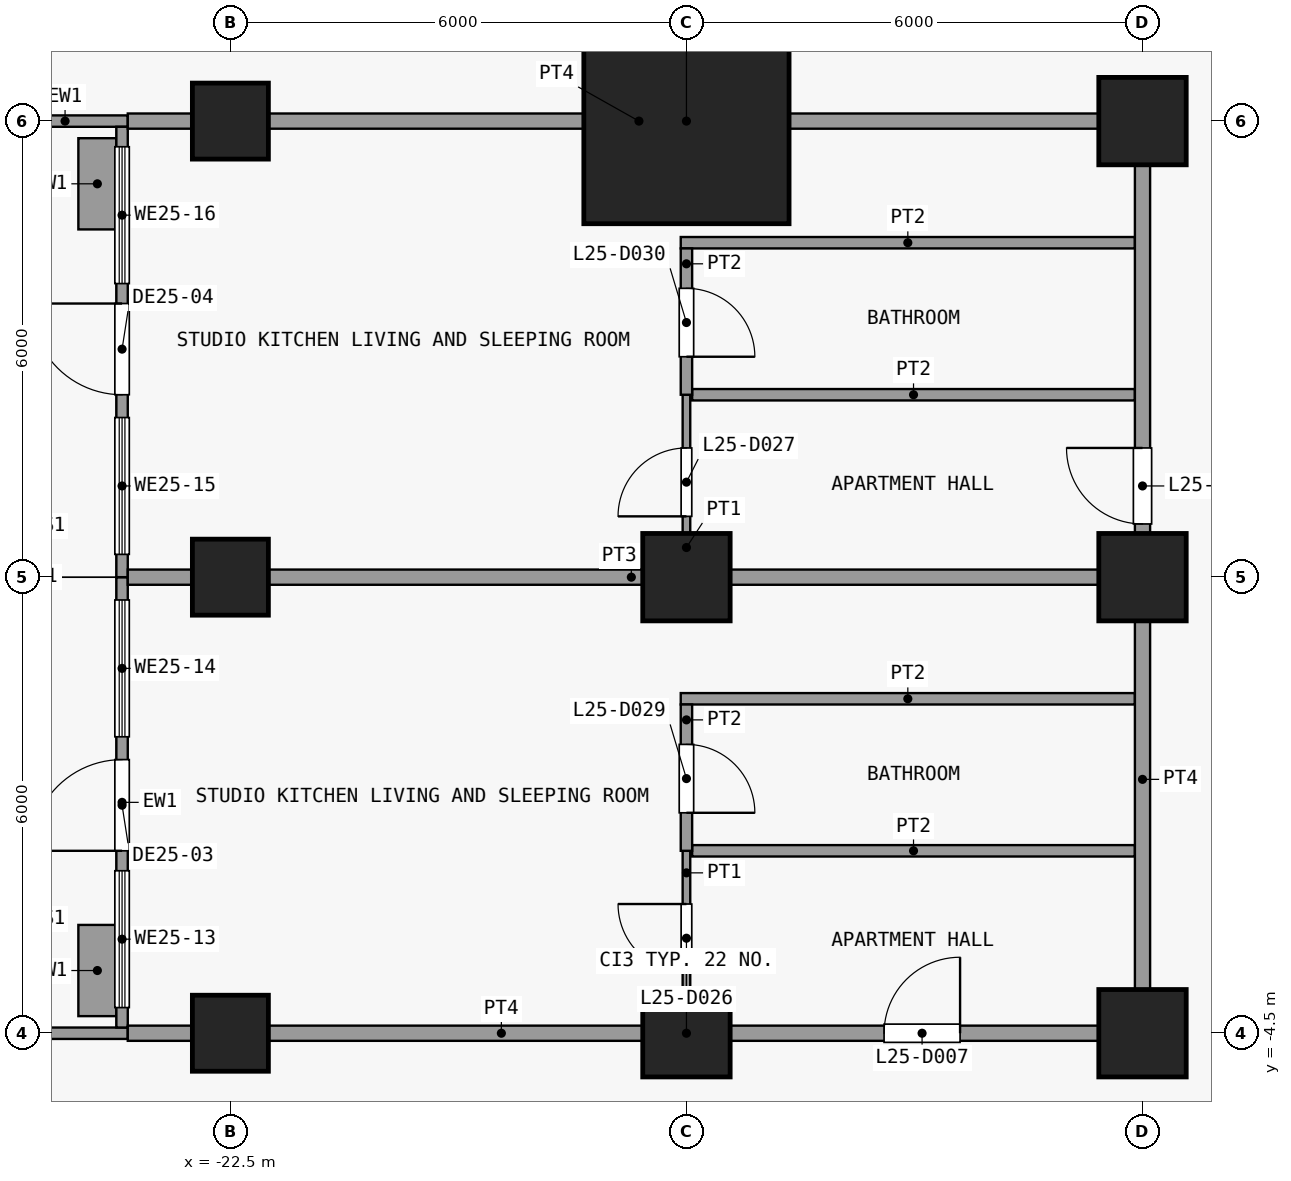
"""IFC4 building model, lengths in metres.
Left out: names, types, materials, properties, quantities, classifications, styles, units other than length and angle.
Written with IfcOpenShell. Run it as: python <this file> out.ifc"""

import sys

from ifc_helpers import new_model, si_unit, direction, frame, frame_2d, origin, origin_2d, place, context, subcontext, project, spatial, rectangle, extrude, element, fill, save


model = new_model("IFC4")
c1 = context("Model", 3, precision=1e-05, world=origin(), true_north=direction((0.0, 1.0)))
c2 = subcontext(c1, "Body", "Model", "MODEL_VIEW")
j1 = project(units=[si_unit("LENGTHUNIT", "METRE"), si_unit("PLANEANGLEUNIT", "RADIAN")], contexts=[c1])
p1 = place(None, origin())
s1 = spatial("IfcSite", under=j1, at=p1, CompositionType="ELEMENT")
p2 = place(p1, origin())
s2 = spatial("IfcBuilding", under=s1, at=p2, CompositionType="ELEMENT")
p3 = place(p2, frame((0.0, 0.0, 102.7)))
s3 = spatial("IfcBuildingStorey", under=s2, at=p3, CompositionType="ELEMENT", Elevation=102.7)
for number, where, z_axis, x_axis in (
    (1, (-22.5, -4.5, 0.0), (0.0, 0.0, 1.0), (1.0, 0.0, 0.0)),
    (2, (-22.5, 1.5, 0.0), (0.0, 0.0, 1.0), (1.0, 0.0, 0.0)),
    (3, (-22.5, 7.5, 0.0), (0.0, 0.0, 1.0), (1.0, 0.0, 0.0)),
):
    element("IfcColumn", number, at=place(p3, frame(where, z_axis=z_axis, x_axis=x_axis)), inside=s3, PredefinedType="COLUMN", context=c2, shape_type="SweptSolid", body=[
        extrude(rectangle(XDim=1.0, YDim=1.0, at=origin_2d()), origin(), (0.0, 0.0, 1.0), 3.6),
    ])
for number, where, z_axis, x_axis in (
    (4, (-16.5, -4.5, 0.0), (0.0, 0.0, 1.0), (1.0, 0.0, 0.0)),
    (5, (-16.5, 1.5, 0.0), (0.0, 0.0, 1.0), (1.0, 0.0, 0.0)),
):
    element("IfcColumn", number, at=place(p3, frame(where, z_axis=z_axis, x_axis=x_axis)), inside=s3, PredefinedType="COLUMN", context=c2, shape_type="SweptSolid", body=[
        extrude(rectangle(XDim=1.15, YDim=1.15, at=origin_2d()), origin(), (0.0, 0.0, 1.0), 3.6),
    ])
p4 = place(p3, frame((-16.5, 7.5, 0.0), z_axis=(0.0, 0.0, 1.0), x_axis=(1.0, 0.0, 0.0)))
e6 = element("IfcColumn", 6, at=p4, inside=s3, PredefinedType="COLUMN", context=c2, shape_type="SweptSolid", body=[
    extrude(rectangle(XDim=2.7, YDim=2.7, at=origin_2d()), origin(), (0.0, 0.0, 1.0), 3.6),
])
for number, where, z_axis, x_axis in (
    (7, (-10.5, -4.5, 0.0), (0.0, 0.0, 1.0), (1.0, 0.0, 0.0)),
    (8, (-10.5, 1.5, 0.0), (0.0, 0.0, 1.0), (1.0, 0.0, 0.0)),
    (9, (-10.5, 7.5, 0.0), (0.0, 0.0, 1.0), (1.0, 0.0, 0.0)),
):
    element("IfcColumn", number, at=place(p3, frame(where, z_axis=z_axis, x_axis=x_axis)), inside=s3, PredefinedType="COLUMN", context=c2, shape_type="SweptSolid", body=[
        extrude(rectangle(XDim=1.15, YDim=1.15, at=origin_2d()), origin(), (0.0, 0.0, 1.0), 3.6),
    ])
p5 = place(p3, frame((-23.85, -4.5, 0.0), z_axis=(0.0, 0.0, 1.0), x_axis=(-1.0, 0.0, 0.0)))
e10 = element("IfcWall", 10, at=p5, inside=s3, PredefinedType="SOLIDWALL", context=c2, shape_type="SweptSolid", body=[
    extrude(rectangle(XDim=2.55, YDim=0.15, at=frame_2d((1.275, 0.0))), origin(), (0.0, 0.0, 1.0), 3.3),
])
p6 = place(p3, frame((-23.925, -4.425, 0.0), z_axis=(0.0, 0.0, 1.0), x_axis=(0.0, 1.0, 0.0)))
e11 = element("IfcWall", 11, at=p6, inside=s3, PredefinedType="SOLIDWALL", context=c2, shape_type="SweptSolid", body=[
    extrude(rectangle(XDim=5.925, YDim=0.15, at=frame_2d((2.962, 0.0))), origin(), (0.0, 0.0, 1.0), 3.3),
])
p7 = place(p6, frame((2.325, 0.0, 0.0)))
e12 = element("IfcOpeningElement", 12, at=p7, cuts=e11, PredefinedType="OPENING", context=c2, shape_type="SweptSolid", body=[
    extrude(rectangle(XDim=1.2, YDim=2.4, at=frame_2d((0.6, 1.2))), frame((0.0, 0.085, 0.0), z_axis=(0.0, -1.0, 0.0), x_axis=(1.0, 0.0, 0.0)), (0.0, 0.0, 1.0), 0.17),
])
p8 = place(p6, frame((0.262, 0.0, 0.9)))
e13 = element("IfcOpeningElement", 13, at=p8, cuts=e11, PredefinedType="OPENING", context=c2, shape_type="SweptSolid", body=[
    extrude(rectangle(XDim=1.8, YDim=2.1, at=frame_2d((0.9, 1.05))), frame((0.0, 0.085, 0.0), z_axis=(0.0, -1.0, 0.0), x_axis=(1.0, 0.0, 0.0)), (0.0, 0.0, 1.0), 0.17),
])
p9 = place(p6, frame((3.825, 0.0, 0.9)))
e14 = element("IfcOpeningElement", 14, at=p9, cuts=e11, PredefinedType="OPENING", context=c2, shape_type="SweptSolid", body=[
    extrude(rectangle(XDim=1.8, YDim=2.1, at=frame_2d((0.9, 1.05))), frame((0.0, 0.085, 0.0), z_axis=(0.0, -1.0, 0.0), x_axis=(1.0, 0.0, 0.0)), (0.0, 0.0, 1.0), 0.17),
])
p10 = place(p3, frame((-24.25, -4.275, 0.0), z_axis=(0.0, 0.0, 1.0), x_axis=(0.0, 1.0, 0.0)))
e15 = element("IfcWall", 15, at=p10, inside=s3, PredefinedType="USERDEFINED", context=c2, shape_type="SweptSolid", body=[
    extrude(rectangle(XDim=1.2, YDim=0.5, at=frame_2d((0.6, 0.0))), origin(), (0.0, 0.0, 1.0), 0.9),
])
p11 = place(p3, frame((-23.85, 7.5, 0.0), z_axis=(0.0, 0.0, 1.0), x_axis=(-1.0, 0.0, 0.0)))
e16 = element("IfcWall", 16, at=p11, inside=s3, PredefinedType="SOLIDWALL", context=c2, shape_type="SweptSolid", body=[
    extrude(rectangle(XDim=1.65, YDim=0.15, at=frame_2d((0.825, 0.0))), origin(), (0.0, 0.0, 1.0), 3.3),
])
p12 = place(p3, frame((-23.925, 1.5, 0.0), z_axis=(0.0, 0.0, 1.0), x_axis=(0.0, 1.0, 0.0)))
e17 = element("IfcWall", 17, at=p12, inside=s3, PredefinedType="SOLIDWALL", context=c2, shape_type="SweptSolid", body=[
    extrude(rectangle(XDim=5.925, YDim=0.15, at=frame_2d((2.962, 0.0))), origin(), (0.0, 0.0, 1.0), 3.3),
])
p13 = place(p12, frame((2.4, 0.0, 0.0)))
e18 = element("IfcOpeningElement", 18, at=p13, cuts=e17, PredefinedType="OPENING", context=c2, shape_type="SweptSolid", body=[
    extrude(rectangle(XDim=1.2, YDim=2.4, at=frame_2d((0.6, 1.2))), frame((0.0, 0.085, 0.0), z_axis=(0.0, -1.0, 0.0), x_axis=(1.0, 0.0, 0.0)), (0.0, 0.0, 1.0), 0.17),
])
p14 = place(p12, frame((0.3, 0.0, 0.9)))
e19 = element("IfcOpeningElement", 19, at=p14, cuts=e17, PredefinedType="OPENING", context=c2, shape_type="SweptSolid", body=[
    extrude(rectangle(XDim=1.8, YDim=2.1, at=frame_2d((0.9, 1.05))), frame((0.0, 0.085, 0.0), z_axis=(0.0, -1.0, 0.0), x_axis=(1.0, 0.0, 0.0)), (0.0, 0.0, 1.0), 0.17),
])
p15 = place(p12, frame((3.863, 0.0, 0.9)))
e20 = element("IfcOpeningElement", 20, at=p15, cuts=e17, PredefinedType="OPENING", context=c2, shape_type="SweptSolid", body=[
    extrude(rectangle(XDim=1.8, YDim=2.1, at=frame_2d((0.9, 1.05))), frame((0.0, 0.085, 0.0), z_axis=(0.0, -1.0, 0.0), x_axis=(1.0, 0.0, 0.0)), (0.0, 0.0, 1.0), 0.17),
])
p16 = place(p3, frame((-24.25, 6.075, 0.0), z_axis=(0.0, 0.0, 1.0), x_axis=(0.0, 1.0, 0.0)))
e21 = element("IfcWall", 21, at=p16, inside=s3, PredefinedType="USERDEFINED", context=c2, shape_type="SweptSolid", body=[
    extrude(rectangle(XDim=1.2, YDim=0.5, at=frame_2d((0.6, 0.0))), origin(), (0.0, 0.0, 1.0), 0.9),
])
p17 = place(p3, frame((-23.85, -4.5, 0.0), z_axis=(0.0, 0.0, 1.0), x_axis=(1.0, 0.0, 0.0)))
e22 = element("IfcWall", 22, at=p17, inside=s3, PredefinedType="PARTITIONING", context=c2, shape_type="SweptSolid", body=[
    extrude(rectangle(XDim=13.45, YDim=0.2, at=frame_2d((6.725, 0.0))), origin(), (0.0, 0.0, 1.0), 3.3),
])
p18 = place(p17, frame((9.95, 0.0, 0.0)))
e23 = element("IfcOpeningElement", 23, at=p18, cuts=e22, PredefinedType="OPENING", context=c2, shape_type="SweptSolid", body=[
    extrude(rectangle(XDim=1.0, YDim=2.1, at=frame_2d((0.5, 1.05))), frame((0.0, 0.11, 0.0), z_axis=(0.0, -1.0, 0.0), x_axis=(1.0, 0.0, 0.0)), (0.0, 0.0, 1.0), 0.22),
])
p19 = place(p3, frame((-16.425, -2.1, 0.0), z_axis=(0.0, 0.0, 1.0), x_axis=(1.0, 0.0, 0.0)))
e24 = element("IfcWall", 24, at=p19, inside=s3, PredefinedType="PARTITIONING", context=c2, shape_type="SweptSolid", body=[
    extrude(rectangle(XDim=5.825, YDim=0.15, at=frame_2d((2.913, 0.0))), origin(), (0.0, 0.0, 1.0), 3.3),
])
p20 = place(p3, frame((-16.575, -0.1, 0.0), z_axis=(0.0, 0.0, 1.0), x_axis=(1.0, 0.0, 0.0)))
e25 = element("IfcWall", 25, at=p20, inside=s3, PredefinedType="PARTITIONING", context=c2, shape_type="SweptSolid", body=[
    extrude(rectangle(XDim=5.975, YDim=0.15, at=frame_2d((2.987, 0.0))), origin(), (0.0, 0.0, 1.0), 3.3),
])
p21 = place(p3, frame((-23.85, 1.5, 0.0), z_axis=(0.0, 0.0, 1.0), x_axis=(1.0, 0.0, 0.0)))
e26 = element("IfcWall", 26, at=p21, inside=s3, PredefinedType="PARTITIONING", context=c2, shape_type="SweptSolid", body=[
    extrude(rectangle(XDim=13.25, YDim=0.2, at=frame_2d((6.625, 0.0))), origin(), (0.0, 0.0, 1.0), 3.3),
])
p22 = place(p3, frame((-16.425, 3.9, 0.0), z_axis=(0.0, 0.0, 1.0), x_axis=(1.0, 0.0, 0.0)))
e27 = element("IfcWall", 27, at=p22, inside=s3, PredefinedType="PARTITIONING", context=c2, shape_type="SweptSolid", body=[
    extrude(rectangle(XDim=5.825, YDim=0.15, at=frame_2d((2.913, 0.0))), origin(), (0.0, 0.0, 1.0), 3.3),
])
p23 = place(p3, frame((-16.575, 5.9, 0.0), z_axis=(0.0, 0.0, 1.0), x_axis=(1.0, 0.0, 0.0)))
e28 = element("IfcWall", 28, at=p23, inside=s3, PredefinedType="PARTITIONING", context=c2, shape_type="SweptSolid", body=[
    extrude(rectangle(XDim=5.975, YDim=0.15, at=frame_2d((2.987, 0.0))), origin(), (0.0, 0.0, 1.0), 3.3),
])
p24 = place(p3, frame((-23.85, 7.5, 0.0), z_axis=(0.0, 0.0, 1.0), x_axis=(1.0, 0.0, 0.0)))
e29 = element("IfcWall", 29, at=p24, inside=s3, PredefinedType="PARTITIONING", context=c2, shape_type="SweptSolid", body=[
    extrude(rectangle(XDim=13.45, YDim=0.2, at=frame_2d((6.725, 0.0))), origin(), (0.0, 0.0, 1.0), 3.3),
])
p25 = place(p3, frame((-16.5, -4.4, 0.0), z_axis=(0.0, 0.0, 1.0), x_axis=(0.0, 1.0, 0.0)))
e30 = element("IfcWall", 30, at=p25, inside=s3, PredefinedType="PARTITIONING", context=c2, shape_type="SweptSolid", body=[
    extrude(rectangle(XDim=2.3, YDim=0.1, at=frame_2d((1.15, 0.0))), origin(), (0.0, 0.0, 1.0), 3.3),
])
p26 = place(p25, frame((0.7, 0.0, 0.0)))
e31 = element("IfcOpeningElement", 31, at=p26, cuts=e30, PredefinedType="OPENING", context=c2, shape_type="SweptSolid", body=[
    extrude(rectangle(XDim=0.9, YDim=2.1, at=frame_2d((0.45, 1.05))), frame((0.0, 0.06, 0.0), z_axis=(0.0, -1.0, 0.0), x_axis=(1.0, 0.0, 0.0)), (0.0, 0.0, 1.0), 0.12),
])
p27 = place(p3, frame((-16.5, 1.6, 0.0), z_axis=(0.0, 0.0, 1.0), x_axis=(0.0, 1.0, 0.0)))
e32 = element("IfcWall", 32, at=p27, inside=s3, PredefinedType="PARTITIONING", context=c2, shape_type="SweptSolid", body=[
    extrude(rectangle(XDim=2.3, YDim=0.1, at=frame_2d((1.15, 0.0))), origin(), (0.0, 0.0, 1.0), 3.3),
])
p28 = place(p27, frame((0.7, 0.0, 0.0)))
e33 = element("IfcOpeningElement", 33, at=p28, cuts=e32, PredefinedType="OPENING", context=c2, shape_type="SweptSolid", body=[
    extrude(rectangle(XDim=0.9, YDim=2.1, at=frame_2d((0.45, 1.05))), frame((0.0, 0.06, 0.0), z_axis=(0.0, -1.0, 0.0), x_axis=(1.0, 0.0, 0.0)), (0.0, 0.0, 1.0), 0.12),
])
p29 = place(p3, frame((-16.5, -2.1, 0.0), z_axis=(0.0, 0.0, 1.0), x_axis=(0.0, 1.0, 0.0)))
e34 = element("IfcWall", 34, at=p29, inside=s3, PredefinedType="PARTITIONING", context=c2, shape_type="SweptSolid", body=[
    extrude(rectangle(XDim=1.925, YDim=0.15, at=frame_2d((0.962, 0.0))), origin(), (0.0, 0.0, 1.0), 3.3),
])
p30 = place(p29, frame((0.5, 0.0, 0.0)))
e35 = element("IfcOpeningElement", 35, at=p30, cuts=e34, PredefinedType="OPENING", context=c2, shape_type="SweptSolid", body=[
    extrude(rectangle(XDim=0.9, YDim=2.1, at=frame_2d((0.45, 1.05))), frame((0.0, 0.085, 0.0), z_axis=(0.0, -1.0, 0.0), x_axis=(1.0, 0.0, 0.0)), (0.0, 0.0, 1.0), 0.17),
])
p31 = place(p3, frame((-16.5, 3.9, 0.0), z_axis=(0.0, 0.0, 1.0), x_axis=(0.0, 1.0, 0.0)))
e36 = element("IfcWall", 36, at=p31, inside=s3, PredefinedType="PARTITIONING", context=c2, shape_type="SweptSolid", body=[
    extrude(rectangle(XDim=1.925, YDim=0.15, at=frame_2d((0.962, 0.0))), origin(), (0.0, 0.0, 1.0), 3.3),
])
p32 = place(p31, frame((0.5, 0.0, 0.0)))
e37 = element("IfcOpeningElement", 37, at=p32, cuts=e36, PredefinedType="OPENING", context=c2, shape_type="SweptSolid", body=[
    extrude(rectangle(XDim=0.9, YDim=2.1, at=frame_2d((0.45, 1.05))), frame((0.0, 0.085, 0.0), z_axis=(0.0, -1.0, 0.0), x_axis=(1.0, 0.0, 0.0)), (0.0, 0.0, 1.0), 0.17),
])
p33 = place(p3, frame((-10.5, -4.4, 0.0), z_axis=(0.0, 0.0, 1.0), x_axis=(0.0, 1.0, 0.0)))
e38 = element("IfcWall", 38, at=p33, inside=s3, PredefinedType="PARTITIONING", context=c2, shape_type="SweptSolid", body=[
    extrude(rectangle(XDim=11.8, YDim=0.2, at=frame_2d((5.9, 0.0))), origin(), (0.0, 0.0, 1.0), 3.3),
])
p34 = place(p33, frame((6.6, 0.0, 0.0)))
e39 = element("IfcOpeningElement", 39, at=p34, cuts=e38, PredefinedType="OPENING", context=c2, shape_type="SweptSolid", body=[
    extrude(rectangle(XDim=1.0, YDim=2.1, at=frame_2d((0.5, 1.05))), frame((0.0, 0.11, 0.0), z_axis=(0.0, -1.0, 0.0), x_axis=(1.0, 0.0, 0.0)), (0.0, 0.0, 1.0), 0.22),
])
p35 = place(p7, origin())
e40 = element("IfcDoor", 40, at=p35, inside=s3, OperationType="SINGLE_SWING_LEFT", PredefinedType="DOOR", context=c2, shape_type="SweptSolid", body=[
    extrude(rectangle(XDim=1.2, YDim=2.4, at=frame_2d((0.6, 1.2))), frame((0.0, 0.025, 0.0), z_axis=(0.0, -1.0, 0.0), x_axis=(1.0, 0.0, 0.0)), (0.0, 0.0, 1.0), 0.05),
])
fill(e12, e40)
p36 = place(p8, origin())
e41 = element("IfcWindow", 41, at=p36, inside=s3, PartitioningType="SINGLE_PANEL", PredefinedType="WINDOW", context=c2, shape_type="SweptSolid", body=[
    extrude(rectangle(XDim=1.8, YDim=2.1, at=frame_2d((0.9, 1.05))), frame((0.0, 0.03, 0.0), z_axis=(0.0, -1.0, 0.0), x_axis=(1.0, 0.0, 0.0)), (0.0, 0.0, 1.0), 0.06),
])
fill(e13, e41)
p37 = place(p9, origin())
e42 = element("IfcWindow", 42, at=p37, inside=s3, PartitioningType="SINGLE_PANEL", PredefinedType="WINDOW", context=c2, shape_type="SweptSolid", body=[
    extrude(rectangle(XDim=1.8, YDim=2.1, at=frame_2d((0.9, 1.05))), frame((0.0, 0.03, 0.0), z_axis=(0.0, -1.0, 0.0), x_axis=(1.0, 0.0, 0.0)), (0.0, 0.0, 1.0), 0.06),
])
fill(e14, e42)
p38 = place(p13, origin())
e43 = element("IfcDoor", 43, at=p38, inside=s3, OperationType="SINGLE_SWING_RIGHT", PredefinedType="DOOR", context=c2, shape_type="SweptSolid", body=[
    extrude(rectangle(XDim=1.2, YDim=2.4, at=frame_2d((0.6, 1.2))), frame((0.0, 0.025, 0.0), z_axis=(0.0, -1.0, 0.0), x_axis=(1.0, 0.0, 0.0)), (0.0, 0.0, 1.0), 0.05),
])
fill(e18, e43)
p39 = place(p14, origin())
e44 = element("IfcWindow", 44, at=p39, inside=s3, PartitioningType="SINGLE_PANEL", PredefinedType="WINDOW", context=c2, shape_type="SweptSolid", body=[
    extrude(rectangle(XDim=1.8, YDim=2.1, at=frame_2d((0.9, 1.05))), frame((0.0, 0.03, 0.0), z_axis=(0.0, -1.0, 0.0), x_axis=(1.0, 0.0, 0.0)), (0.0, 0.0, 1.0), 0.06),
])
fill(e19, e44)
p40 = place(p15, origin())
e45 = element("IfcWindow", 45, at=p40, inside=s3, PartitioningType="SINGLE_PANEL", PredefinedType="WINDOW", context=c2, shape_type="SweptSolid", body=[
    extrude(rectangle(XDim=1.8, YDim=2.1, at=frame_2d((0.9, 1.05))), frame((0.0, 0.03, 0.0), z_axis=(0.0, -1.0, 0.0), x_axis=(1.0, 0.0, 0.0)), (0.0, 0.0, 1.0), 0.06),
])
fill(e20, e45)
p41 = place(p18, origin())
e46 = element("IfcDoor", 46, at=p41, inside=s3, OperationType="SINGLE_SWING_LEFT", PredefinedType="DOOR", context=c2, shape_type="SweptSolid", body=[
    extrude(rectangle(XDim=1.0, YDim=2.1, at=frame_2d((0.5, 1.05))), frame((0.0, 0.025, 0.0), z_axis=(0.0, -1.0, 0.0), x_axis=(1.0, 0.0, 0.0)), (0.0, 0.0, 1.0), 0.05),
])
fill(e23, e46)
p42 = place(p26, origin())
e47 = element("IfcDoor", 47, at=p42, inside=s3, OperationType="SINGLE_SWING_LEFT", PredefinedType="DOOR", context=c2, shape_type="SweptSolid", body=[
    extrude(rectangle(XDim=0.9, YDim=2.1, at=frame_2d((0.45, 1.05))), frame((0.0, 0.025, 0.0), z_axis=(0.0, -1.0, 0.0), x_axis=(1.0, 0.0, 0.0)), (0.0, 0.0, 1.0), 0.05),
])
fill(e31, e47)
p43 = place(p28, origin())
e48 = element("IfcDoor", 48, at=p43, inside=s3, OperationType="SINGLE_SWING_RIGHT", PredefinedType="DOOR", context=c2, shape_type="SweptSolid", body=[
    extrude(rectangle(XDim=0.9, YDim=2.1, at=frame_2d((0.45, 1.05))), frame((0.0, 0.025, 0.0), z_axis=(0.0, -1.0, 0.0), x_axis=(1.0, 0.0, 0.0)), (0.0, 0.0, 1.0), 0.05),
])
fill(e33, e48)
p44 = place(p30, origin())
e49 = element("IfcDoor", 49, at=p44, inside=s3, OperationType="SINGLE_SWING_LEFT", PredefinedType="DOOR", context=c2, shape_type="SweptSolid", body=[
    extrude(rectangle(XDim=0.9, YDim=2.1, at=frame_2d((0.45, 1.05))), frame((0.0, 0.025, 0.0), z_axis=(0.0, -1.0, 0.0), x_axis=(1.0, 0.0, 0.0)), (0.0, 0.0, 1.0), 0.05),
])
fill(e35, e49)
p45 = place(p32, origin())
e50 = element("IfcDoor", 50, at=p45, inside=s3, OperationType="SINGLE_SWING_LEFT", PredefinedType="DOOR", context=c2, shape_type="SweptSolid", body=[
    extrude(rectangle(XDim=0.9, YDim=2.1, at=frame_2d((0.45, 1.05))), frame((0.0, 0.025, 0.0), z_axis=(0.0, -1.0, 0.0), x_axis=(1.0, 0.0, 0.0)), (0.0, 0.0, 1.0), 0.05),
])
fill(e37, e50)
p46 = place(p34, origin())
e51 = element("IfcDoor", 51, at=p46, inside=s3, OperationType="SINGLE_SWING_LEFT", PredefinedType="DOOR", context=c2, shape_type="SweptSolid", body=[
    extrude(rectangle(XDim=1.0, YDim=2.1, at=frame_2d((0.5, 1.05))), frame((0.0, 0.025, 0.0), z_axis=(0.0, -1.0, 0.0), x_axis=(1.0, 0.0, 0.0)), (0.0, 0.0, 1.0), 0.05),
])
fill(e39, e51)
save(model, sys.argv[1])
